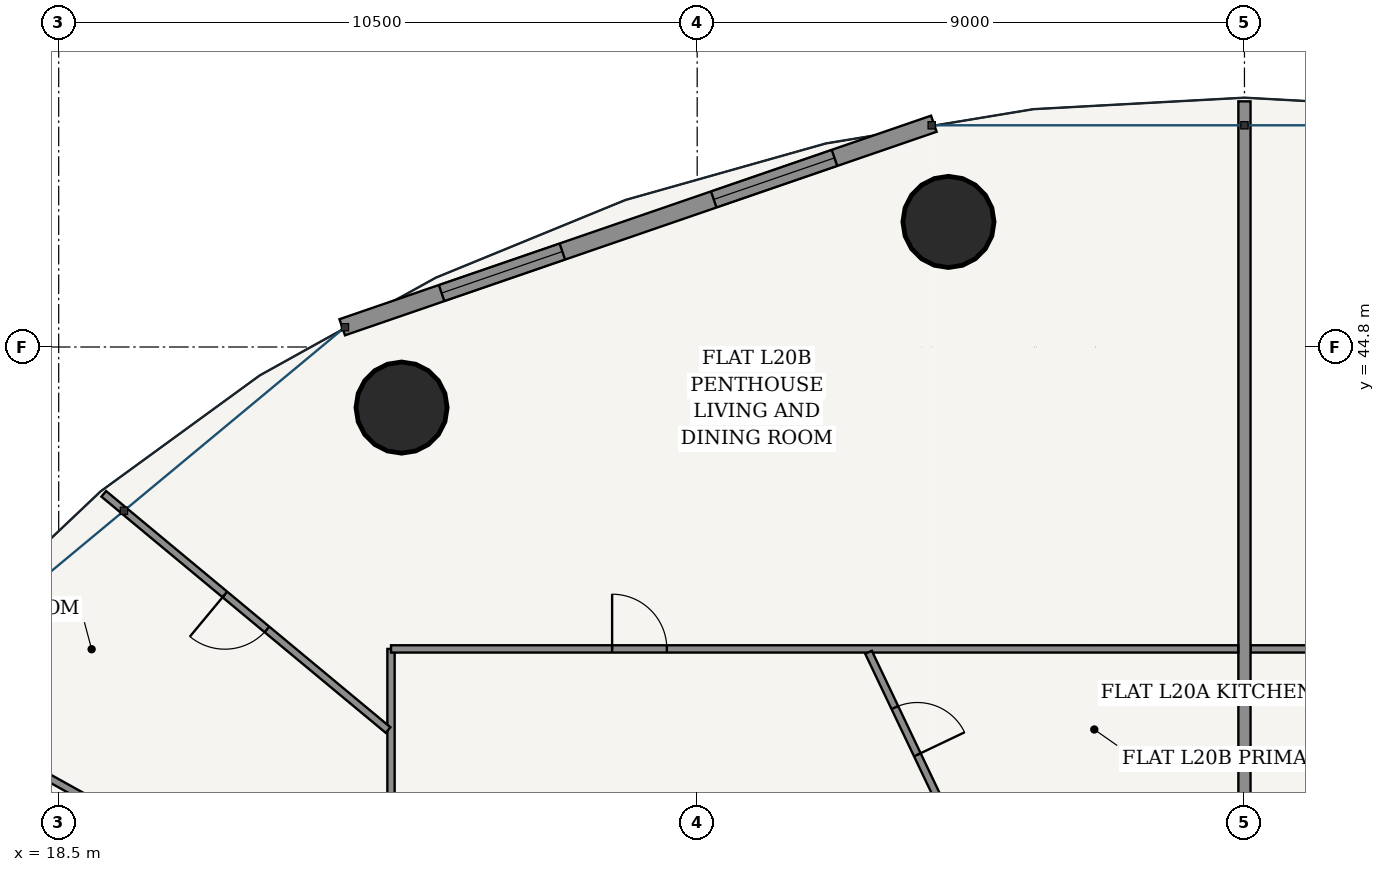
"""IFC4 building model, lengths in metres.
Left out: names, types, materials, properties, quantities, classifications, styles, units other than length and angle.
Written with IfcOpenShell. Run it as: python <this file> out.ifc"""

import sys

from ifc_helpers import new_model, si_unit, direction, frame, frame_2d, origin, origin_2d, place, context, subcontext, project, spatial, rectangle, hollow_circle, extrude, source, transform, mapped, element, fill, save


model = new_model("IFC4")
c1 = context("Model", 3, precision=1e-05, world=origin(), true_north=direction((-0.2419218956, 0.970295726276)))
c2 = subcontext(c1, "Body", "Model", "MODEL_VIEW")
j1 = project(units=[si_unit("LENGTHUNIT", "METRE"), si_unit("PLANEANGLEUNIT", "RADIAN")], contexts=[c1])
p1 = place(None, origin())
s1 = spatial("IfcSite", under=j1, at=p1, CompositionType="ELEMENT")
p2 = place(p1, origin())
s2 = spatial("IfcBuilding", under=s1, at=p2, CompositionType="ELEMENT")
p3 = place(p2, frame((0.0, 0.0, 79.8)))
s3 = spatial("IfcBuildingStorey", under=s2, at=p3, CompositionType="ELEMENT", Elevation=79.8)
for number, where, z_axis, x_axis in (
    (1, (33.133, 46.857, 0.0), (0.0, 0.0, 1.0), (1.0, 0.0, 0.0)),
    (2, (24.138, 43.803, 0.0), (0.0, 0.0, 1.0), (1.0, 0.0, 0.0)),
):
    element("IfcColumn", number, at=place(p3, frame(where, z_axis=z_axis, x_axis=x_axis)), inside=s3, PredefinedType="COLUMN", context=c2, shape_type="SweptSolid", body=[
        extrude(hollow_circle(Radius=0.75, WallThickness=0.045, at=origin_2d()), origin(), (0.0, 0.0, 1.0), 3.6),
    ])
p4 = place(p3, frame((32.892, 48.472, 0.0), z_axis=(0.0, 0.0, 1.0), x_axis=(-0.945597432299, -0.325339047809, 0.0)))
e3 = element("IfcWall", 3, at=p4, inside=s3, PredefinedType="SOLIDWALL", context=c2, shape_type="SweptSolid", body=[
    extrude(rectangle(XDim=10.289, YDim=0.28, at=frame_2d((5.145, 0.0))), origin(), (0.0, 0.0, 1.0), 3.325),
])
p5 = place(p4, frame((1.728, 0.0, 0.85)))
e4 = element("IfcOpeningElement", 4, at=p5, cuts=e3, PredefinedType="OPENING", context=c2, shape_type="SweptSolid", body=[
    extrude(rectangle(XDim=2.1, YDim=1.95, at=frame_2d((1.05, 0.975))), frame((0.0, 0.15, 0.0), z_axis=(0.0, -1.0, 0.0), x_axis=(1.0, 0.0, 0.0)), (0.0, 0.0, 1.0), 0.3),
])
p6 = place(p4, frame((6.461, 0.0, 0.85)))
e5 = element("IfcOpeningElement", 5, at=p6, cuts=e3, PredefinedType="OPENING", context=c2, shape_type="SweptSolid", body=[
    extrude(rectangle(XDim=2.1, YDim=1.95, at=frame_2d((1.05, 0.975))), frame((0.0, 0.15, 0.0), z_axis=(0.0, -1.0, 0.0), x_axis=(1.0, 0.0, 0.0)), (0.0, 0.0, 1.0), 0.3),
])
p7 = place(p3, frame((38.102, 39.835, 0.0), z_axis=(0.0, 0.0, 1.0), x_axis=(1.0, 0.0, 0.0)))
e6 = element("IfcWall", 6, at=p7, inside=s3, PredefinedType="PARTITIONING", context=c2, shape_type="SweptSolid", body=[
    extrude(rectangle(XDim=13.933, YDim=0.12, at=frame_2d((6.966, 0.0))), origin(), (0.0, 0.0, 1.0), 2.767),
])
p8 = place(p7, frame((2.769, 0.0, 0.0)))
e7 = element("IfcOpeningElement", 7, at=p8, cuts=e6, PredefinedType="OPENING", context=c2, shape_type="SweptSolid", body=[
    extrude(rectangle(XDim=0.9, YDim=2.15, at=frame_2d((0.45, 1.075))), frame((0.0, 0.07, 0.0), z_axis=(0.0, -1.0, 0.0), x_axis=(1.0, 0.0, 0.0)), (0.0, 0.0, 1.0), 0.14),
])
p9 = place(p3, frame((38.0, 37.185, 0.0), z_axis=(0.0, 0.0, 1.0), x_axis=(0.0, 1.0, 0.0)))
e8 = element("IfcWall", 8, at=p9, inside=s3, PredefinedType="PARTITIONING", context=c2, shape_type="SweptSolid", body=[
    extrude(rectangle(XDim=11.655, YDim=0.2, at=frame_2d((5.828, 0.0))), origin(), (0.0, 0.0, 1.0), 2.767),
])
p10 = place(p3, frame((23.965, 24.583, 0.0), z_axis=(0.0, 0.0, 1.0), x_axis=(0.0, 1.0, 0.0)))
e9 = element("IfcWall", 9, at=p10, inside=s3, PredefinedType="PARTITIONING", context=c2, shape_type="SweptSolid", body=[
    extrude(rectangle(XDim=15.252, YDim=0.12, at=frame_2d((7.626, 0.0))), origin(), (0.0, 0.0, 1.0), 2.767),
])
p11 = place(p3, frame((23.965, 39.835, 0.0), z_axis=(0.0, 0.0, 1.0), x_axis=(1.0, 0.0, 0.0)))
e10 = element("IfcWall", 10, at=p11, inside=s3, PredefinedType="PARTITIONING", context=c2, shape_type="SweptSolid", body=[
    extrude(rectangle(XDim=13.933, YDim=0.12, at=frame_2d((6.966, 0.0))), origin(), (0.0, 0.0, 1.0), 2.767),
])
p12 = place(p11, frame((3.636, 0.0, 0.0)))
e11 = element("IfcOpeningElement", 11, at=p12, cuts=e10, PredefinedType="OPENING", context=c2, shape_type="SweptSolid", body=[
    extrude(rectangle(XDim=0.9, YDim=2.15, at=frame_2d((0.45, 1.075))), frame((0.0, 0.07, 0.0), z_axis=(0.0, -1.0, 0.0), x_axis=(1.0, 0.0, 0.0)), (0.0, 0.0, 1.0), 0.14),
])
p13 = place(p3, frame((23.917, 38.5, 0.0), z_axis=(0.0, 0.0, 1.0), x_axis=(-0.769161827891, 0.63905405289, 0.0)))
e12 = element("IfcWall", 12, at=p13, inside=s3, PredefinedType="PARTITIONING", context=c2, shape_type="SweptSolid", body=[
    extrude(rectangle(XDim=6.08, YDim=0.12, at=frame_2d((3.04, 0.0))), origin(), (0.0, 0.0, 1.0), 2.767),
])
p14 = place(p13, frame((2.59, 0.0, 0.0)))
e13 = element("IfcOpeningElement", 13, at=p14, cuts=e12, PredefinedType="OPENING", context=c2, shape_type="SweptSolid", body=[
    extrude(rectangle(XDim=0.9, YDim=2.15, at=frame_2d((0.45, 1.075))), frame((0.0, 0.07, 0.0), z_axis=(0.0, -1.0, 0.0), x_axis=(1.0, 0.0, 0.0)), (0.0, 0.0, 1.0), 0.14),
])
p15 = place(p3, frame((23.911, 34.622, 0.0), z_axis=(0.0, 0.0, 1.0), x_axis=(-0.874324904351, 0.485341077626, 0.0)))
e14 = element("IfcWall", 14, at=p15, inside=s3, PredefinedType="PARTITIONING", context=c2, shape_type="SweptSolid", body=[
    extrude(rectangle(XDim=9.066, YDim=0.12, at=frame_2d((4.533, 0.0))), origin(), (0.0, 0.0, 1.0), 2.767),
])
p16 = place(p15, frame((3.016, 0.0, 0.0)))
e15 = element("IfcOpeningElement", 15, at=p16, cuts=e14, PredefinedType="OPENING", context=c2, shape_type="SweptSolid", body=[
    extrude(rectangle(XDim=0.9, YDim=2.15, at=frame_2d((0.45, 1.075))), frame((0.0, 0.07, 0.0), z_axis=(0.0, -1.0, 0.0), x_axis=(1.0, 0.0, 0.0)), (0.0, 0.0, 1.0), 0.14),
])
p17 = place(p3, frame((33.053, 37.185, 0.0), z_axis=(0.0, 0.0, 1.0), x_axis=(-0.429966564324, 0.902844811451, 0.0)))
e16 = element("IfcWall", 16, at=p17, inside=s3, PredefinedType="PARTITIONING", context=c2, shape_type="SweptSolid", body=[
    extrude(rectangle(XDim=2.873, YDim=0.12, at=frame_2d((1.437, 0.0))), origin(), (0.0, 0.0, 1.0), 3.325),
])
p18 = place(p17, frame((1.007, 0.0, 0.0)))
e17 = element("IfcOpeningElement", 17, at=p18, cuts=e16, PredefinedType="OPENING", context=c2, shape_type="SweptSolid", body=[
    extrude(rectangle(XDim=0.86, YDim=2.15, at=frame_2d((0.43, 1.075))), frame((0.0, 0.07, 0.0), z_axis=(0.0, -1.0, 0.0), x_axis=(1.0, 0.0, 0.0)), (0.0, 0.0, 1.0), 0.14),
])
m1 = source(origin(), c2, "Body", "SweptSolid", [
    extrude(rectangle(XDim=2.1, YDim=1.95, at=frame_2d((1.05, 0.975))), frame((0.0, 0.03, 0.0), z_axis=(0.0, -1.0, 0.0), x_axis=(1.0, 0.0, 0.0)), (0.0, 0.0, 1.0), 0.06),
])
p19 = place(p5, origin())
e18 = element("IfcWindow", 18, at=p19, inside=s3, PartitioningType="SINGLE_PANEL", PredefinedType="WINDOW", context=c2, shape_type="MappedRepresentation", body=[
    mapped(m1, transform((0.0, 0.0, 0.0), scale=1.0)),
])
fill(e4, e18)
p20 = place(p6, origin())
e19 = element("IfcWindow", 19, at=p20, inside=s3, PartitioningType="SINGLE_PANEL", PredefinedType="WINDOW", context=c2, shape_type="MappedRepresentation", body=[
    mapped(m1, transform((0.0, 0.0, 0.0), scale=1.0)),
])
fill(e5, e19)
m2 = source(origin(), c2, "Body", "SweptSolid", [
    extrude(rectangle(XDim=0.86, YDim=2.15, at=frame_2d((0.43, 1.075))), frame((0.0, 0.025, 0.0), z_axis=(0.0, -1.0, 0.0), x_axis=(1.0, 0.0, 0.0)), (0.0, 0.0, 1.0), 0.05),
])
p21 = place(p18, frame((0.86, 0.0, 0.0), z_axis=(0.0, 0.0, 1.0), x_axis=(-1.0, 0.0, 0.0)))
e20 = element("IfcDoor", 20, at=p21, inside=s3, OperationType="SINGLE_SWING_RIGHT", PredefinedType="DOOR", context=c2, shape_type="MappedRepresentation", body=[
    mapped(m2, transform((0.0, 0.0, 0.0), scale=1.0)),
])
fill(e17, e20)
m3 = source(origin(), c2, "Body", "SweptSolid", [
    extrude(rectangle(XDim=0.9, YDim=2.15, at=frame_2d((0.45, 1.075))), frame((0.0, 0.025, 0.0), z_axis=(0.0, -1.0, 0.0), x_axis=(1.0, 0.0, 0.0)), (0.0, 0.0, 1.0), 0.05),
])
p22 = place(p12, origin())
e21 = element("IfcDoor", 21, at=p22, inside=s3, OperationType="SINGLE_SWING_LEFT", PredefinedType="DOOR", context=c2, shape_type="MappedRepresentation", body=[
    mapped(m3, transform((0.0, 0.0, 0.0), scale=1.0)),
])
fill(e11, e21)
p23 = place(p14, origin())
e22 = element("IfcDoor", 22, at=p23, inside=s3, OperationType="SINGLE_SWING_RIGHT", PredefinedType="DOOR", context=c2, shape_type="MappedRepresentation", body=[
    mapped(m3, transform((0.0, 0.0, 0.0), scale=1.0)),
])
fill(e13, e22)
save(model, sys.argv[1])
